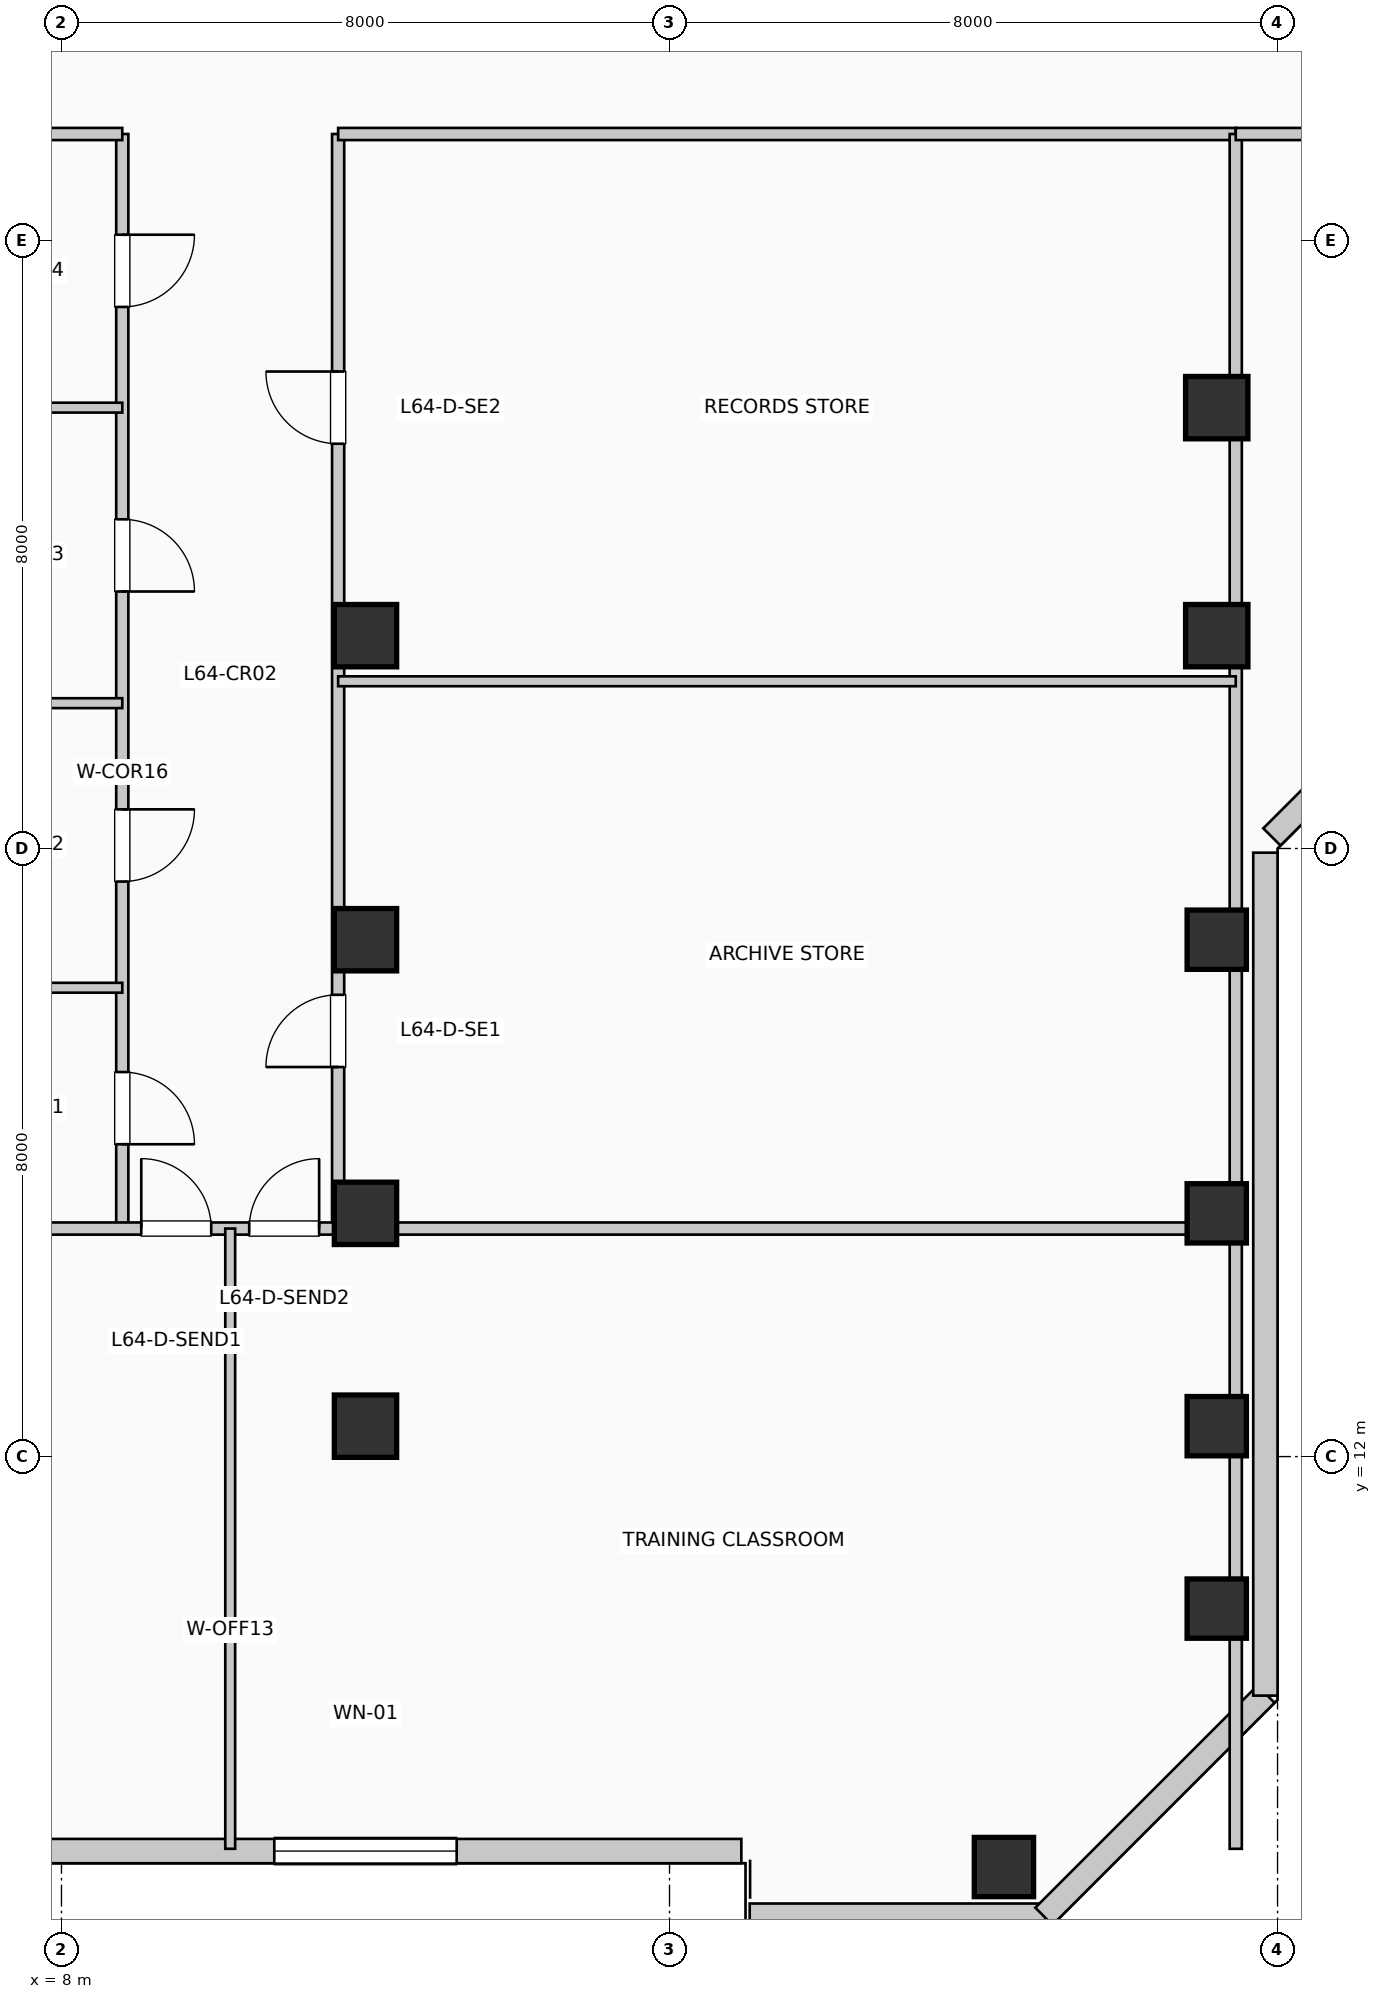
"""IFC4 building model, lengths in metres.
Left out: names, types, materials, properties, quantities, classifications, styles, units other than length and angle.
Written with IfcOpenShell. Run it as: python <this file> out.ifc"""

import sys

from ifc_helpers import new_model, si_unit, direction, frame, frame_2d, origin, origin_2d, place, context, subcontext, project, spatial, rectangle, extrude, element, fill, save


model = new_model("IFC4")
c1 = context("Model", 3, precision=1e-05, world=origin(), true_north=direction((0.0, 1.0)))
c2 = subcontext(c1, "Body", "Model", "MODEL_VIEW")
j1 = project(units=[si_unit("LENGTHUNIT", "METRE"), si_unit("PLANEANGLEUNIT", "RADIAN")], contexts=[c1])
p1 = place(None, origin())
s1 = spatial("IfcSite", under=j1, at=p1, CompositionType="ELEMENT")
p2 = place(p1, origin())
s2 = spatial("IfcBuilding", under=s1, at=p2, CompositionType="ELEMENT")
p3 = place(p2, frame((0.0, 0.0, 264.33)))
s3 = spatial("IfcBuildingStorey", under=s2, at=p3, CompositionType="ELEMENT", Elevation=264.33)
for number, where, z_axis, x_axis in (
    (1, (12.0, 12.4, 0.0), (0.0, 0.0, 1.0), (1.0, 0.0, 0.0)),
    (2, (12.0, 15.2, 0.0), (0.0, 0.0, 1.0), (1.0, 0.0, 0.0)),
    (3, (12.0, 18.8, 0.0), (0.0, 0.0, 1.0), (1.0, 0.0, 0.0)),
    (4, (12.0, 22.8, 0.0), (0.0, 0.0, 1.0), (1.0, 0.0, 0.0)),
):
    element("IfcColumn", number, at=place(p3, frame(where, z_axis=z_axis, x_axis=x_axis)), inside=s3, PredefinedType="COLUMN", context=c2, shape_type="SweptSolid", body=[
        extrude(rectangle(XDim=0.82, YDim=0.82, at=origin_2d()), origin(), (0.0, 0.0, 1.0), 3.96),
    ])
for number, where, z_axis, x_axis in (
    (5, (20.4, 6.6, 0.0), (0.0, 0.0, 1.0), (1.0, 0.0, 0.0)),
    (6, (23.2, 10.0, 0.0), (0.0, 0.0, 1.0), (1.0, 0.0, 0.0)),
    (7, (23.2, 12.4, 0.0), (0.0, 0.0, 1.0), (1.0, 0.0, 0.0)),
    (8, (23.2, 15.2, 0.0), (0.0, 0.0, 1.0), (1.0, 0.0, 0.0)),
    (9, (23.2, 18.8, 0.0), (0.0, 0.0, 1.0), (1.0, 0.0, 0.0)),
):
    element("IfcColumn", number, at=place(p3, frame(where, z_axis=z_axis, x_axis=x_axis)), inside=s3, PredefinedType="COLUMN", context=c2, shape_type="SweptSolid", body=[
        extrude(rectangle(XDim=0.78, YDim=0.78, at=origin_2d()), origin(), (0.0, 0.0, 1.0), 3.96),
    ])
for number, where, z_axis, x_axis in (
    (10, (23.2, 22.8, 0.0), (0.0, 0.0, 1.0), (1.0, 0.0, 0.0)),
    (11, (23.2, 25.8, 0.0), (0.0, 0.0, 1.0), (1.0, 0.0, 0.0)),
):
    element("IfcColumn", number, at=place(p3, frame(where, z_axis=z_axis, x_axis=x_axis)), inside=s3, PredefinedType="COLUMN", context=c2, shape_type="SweptSolid", body=[
        extrude(rectangle(XDim=0.82, YDim=0.82, at=origin_2d()), origin(), (0.0, 0.0, 1.0), 3.96),
    ])
p4 = place(p3, frame((7.055, 6.81, 0.0), z_axis=(0.0, 0.0, 1.0), x_axis=(1.0, 0.0, 0.0)))
e12 = element("IfcWall", 12, at=p4, inside=s3, PredefinedType="SOLIDWALL", context=c2, shape_type="SweptSolid", body=[
    extrude(rectangle(XDim=9.89, YDim=0.32, at=frame_2d((4.945, 0.0))), origin(), (0.0, 0.0, 1.0), 3.71),
])
p5 = place(p4, frame((3.745, 0.0, 0.85)))
e13 = element("IfcOpeningElement", 13, at=p5, cuts=e12, PredefinedType="OPENING", context=c2, shape_type="SweptSolid", body=[
    extrude(rectangle(XDim=2.4, YDim=2.05, at=frame_2d((1.2, 1.025))), frame((0.0, 0.17, 0.0), z_axis=(0.0, -1.0, 0.0), x_axis=(1.0, 0.0, 0.0)), (0.0, 0.0, 1.0), 0.34),
])
p6 = place(p3, frame((17.055, 5.96, 0.0), z_axis=(0.0, 0.0, 1.0), x_axis=(1.0, 0.0, 0.0)))
e14 = element("IfcWall", 14, at=p6, inside=s3, PredefinedType="SOLIDWALL", context=c2, shape_type="SweptSolid", body=[
    extrude(rectangle(XDim=3.89, YDim=0.32, at=frame_2d((1.945, 0.0))), origin(), (0.0, 0.0, 1.0), 3.71),
])
p7 = place(p3, frame((20.926, 5.952, 0.0), z_axis=(0.0, 0.0, 1.0), x_axis=(0.707077242712, 0.707136318428, 0.0)))
e15 = element("IfcWall", 15, at=p7, inside=s3, PredefinedType="SOLIDWALL", context=c2, shape_type="SweptSolid", body=[
    extrude(rectangle(XDim=4.133, YDim=0.32, at=frame_2d((2.066, 0.0))), origin(), (0.0, 0.0, 1.0), 3.71),
])
p8 = place(p3, frame((23.84, 8.855, 0.0), z_axis=(0.0, 0.0, 1.0), x_axis=(0.0, 1.0, 0.0)))
e16 = element("IfcWall", 16, at=p8, inside=s3, PredefinedType="SOLIDWALL", context=c2, shape_type="SweptSolid", body=[
    extrude(rectangle(XDim=11.09, YDim=0.32, at=frame_2d((5.545, 0.0))), origin(), (0.0, 0.0, 1.0), 3.71),
])
p9 = place(p3, frame((23.926, 20.152, 0.0), z_axis=(0.0, 0.0, 1.0), x_axis=(0.707106781187, 0.707106781187, 0.0)))
e17 = element("IfcWall", 17, at=p9, inside=s3, PredefinedType="SOLIDWALL", context=c2, shape_type="SweptSolid", body=[
    extrude(rectangle(XDim=2.718, YDim=0.32, at=frame_2d((1.359, 0.0))), origin(), (0.0, 0.0, 1.0), 3.71),
])
p10 = place(p3, frame((8.8, 15.0, 0.0), z_axis=(0.0, 0.0, 1.0), x_axis=(0.0, 1.0, 0.0)))
e18 = element("IfcWall", 18, at=p10, inside=s3, PredefinedType="PARTITIONING", context=c2, shape_type="SweptSolid", body=[
    extrude(rectangle(XDim=14.4, YDim=0.16, at=frame_2d((7.2, 0.0))), origin(), (0.0, 0.0, 1.0), 3.71),
])
p11 = place(p10, frame((2.059, 0.0, 0.0), z_axis=(0.0, 0.0, 1.0), x_axis=(-1.0, 0.0, 0.0)))
e19 = element("IfcOpeningElement", 19, at=p11, cuts=e18, PredefinedType="OPENING", context=c2, shape_type="SweptSolid", body=[
    extrude(rectangle(XDim=0.95, YDim=2.15, at=frame_2d((0.475, 1.075))), frame((0.0, 0.09, 0.0), z_axis=(0.0, -1.0, 0.0), x_axis=(1.0, 0.0, 0.0)), (0.0, 0.0, 1.0), 0.18),
])
p12 = place(p10, frame((5.515, 0.0, 0.0), z_axis=(0.0, 0.0, 1.0), x_axis=(-1.0, 0.0, 0.0)))
e20 = element("IfcOpeningElement", 20, at=p12, cuts=e18, PredefinedType="OPENING", context=c2, shape_type="SweptSolid", body=[
    extrude(rectangle(XDim=0.95, YDim=2.15, at=frame_2d((0.475, 1.075))), frame((0.0, 0.09, 0.0), z_axis=(0.0, -1.0, 0.0), x_axis=(1.0, 0.0, 0.0)), (0.0, 0.0, 1.0), 0.18),
])
p13 = place(p10, frame((9.331, 0.0, 0.0), z_axis=(0.0, 0.0, 1.0), x_axis=(-1.0, 0.0, 0.0)))
e21 = element("IfcOpeningElement", 21, at=p13, cuts=e18, PredefinedType="OPENING", context=c2, shape_type="SweptSolid", body=[
    extrude(rectangle(XDim=0.95, YDim=2.15, at=frame_2d((0.475, 1.075))), frame((0.0, 0.09, 0.0), z_axis=(0.0, -1.0, 0.0), x_axis=(1.0, 0.0, 0.0)), (0.0, 0.0, 1.0), 0.18),
])
p14 = place(p10, frame((13.075, 0.0, 0.0), z_axis=(0.0, 0.0, 1.0), x_axis=(-1.0, 0.0, 0.0)))
e22 = element("IfcOpeningElement", 22, at=p14, cuts=e18, PredefinedType="OPENING", context=c2, shape_type="SweptSolid", body=[
    extrude(rectangle(XDim=0.95, YDim=2.15, at=frame_2d((0.475, 1.075))), frame((0.0, 0.09, 0.0), z_axis=(0.0, -1.0, 0.0), x_axis=(1.0, 0.0, 0.0)), (0.0, 0.0, 1.0), 0.18),
])
p15 = place(p3, frame((11.64, 15.0, 0.0), z_axis=(0.0, 0.0, 1.0), x_axis=(0.0, 1.0, 0.0)))
e23 = element("IfcWall", 23, at=p15, inside=s3, PredefinedType="PARTITIONING", context=c2, shape_type="SweptSolid", body=[
    extrude(rectangle(XDim=14.4, YDim=0.16, at=frame_2d((7.2, 0.0))), origin(), (0.0, 0.0, 1.0), 3.095),
])
p16 = place(p15, frame((2.125, 0.0, 0.0)))
e24 = element("IfcOpeningElement", 24, at=p16, cuts=e23, PredefinedType="OPENING", context=c2, shape_type="SweptSolid", body=[
    extrude(rectangle(XDim=0.95, YDim=2.15, at=frame_2d((0.475, 1.075))), frame((0.0, 0.09, 0.0), z_axis=(0.0, -1.0, 0.0), x_axis=(1.0, 0.0, 0.0)), (0.0, 0.0, 1.0), 0.18),
])
p17 = place(p15, frame((10.325, 0.0, 0.0)))
e25 = element("IfcOpeningElement", 25, at=p17, cuts=e23, PredefinedType="OPENING", context=c2, shape_type="SweptSolid", body=[
    extrude(rectangle(XDim=0.95, YDim=2.15, at=frame_2d((0.475, 1.075))), frame((0.0, 0.09, 0.0), z_axis=(0.0, -1.0, 0.0), x_axis=(1.0, 0.0, 0.0)), (0.0, 0.0, 1.0), 0.18),
])
p18 = place(p3, frame((0.19, 15.0, 0.0), z_axis=(0.0, 0.0, 1.0), x_axis=(1.0, 0.0, 0.0)))
e26 = element("IfcWall", 26, at=p18, inside=s3, PredefinedType="PARTITIONING", context=c2, shape_type="SweptSolid", body=[
    extrude(rectangle(XDim=23.26, YDim=0.16, at=frame_2d((11.63, 0.0))), origin(), (0.0, 0.0, 1.0), 3.095),
])
p19 = place(p18, frame((8.86, 0.0, 0.0)))
e27 = element("IfcOpeningElement", 27, at=p19, cuts=e26, PredefinedType="OPENING", context=c2, shape_type="SweptSolid", body=[
    extrude(rectangle(XDim=0.92, YDim=2.1, at=frame_2d((0.46, 1.05))), frame((0.0, 0.09, 0.0), z_axis=(0.0, -1.0, 0.0), x_axis=(1.0, 0.0, 0.0)), (0.0, 0.0, 1.0), 0.18),
])
p20 = place(p18, frame((10.28, 0.0, 0.0)))
e28 = element("IfcOpeningElement", 28, at=p20, cuts=e26, PredefinedType="OPENING", context=c2, shape_type="SweptSolid", body=[
    extrude(rectangle(XDim=0.92, YDim=2.1, at=frame_2d((0.46, 1.05))), frame((0.0, 0.09, 0.0), z_axis=(0.0, -1.0, 0.0), x_axis=(1.0, 0.0, 0.0)), (0.0, 0.0, 1.0), 0.18),
])
p21 = place(p3, frame((0.19, 29.4, 0.0), z_axis=(0.0, 0.0, 1.0), x_axis=(1.0, 0.0, 0.0)))
e29 = element("IfcWall", 29, at=p21, inside=s3, PredefinedType="PARTITIONING", context=c2, shape_type="SweptSolid", body=[
    extrude(rectangle(XDim=8.61, YDim=0.16, at=frame_2d((4.305, 0.0))), origin(), (0.0, 0.0, 1.0), 3.365),
])
p22 = place(p3, frame((11.64, 29.4, 0.0), z_axis=(0.0, 0.0, 1.0), x_axis=(1.0, 0.0, 0.0)))
e30 = element("IfcWall", 30, at=p22, inside=s3, PredefinedType="PARTITIONING", context=c2, shape_type="SweptSolid", body=[
    extrude(rectangle(XDim=11.81, YDim=0.16, at=frame_2d((5.905, 0.0))), origin(), (0.0, 0.0, 1.0), 3.365),
])
p23 = place(p3, frame((23.45, 6.84, 0.0), z_axis=(0.0, 0.0, 1.0), x_axis=(0.0, 1.0, 0.0)))
e31 = element("IfcWall", 31, at=p23, inside=s3, PredefinedType="PARTITIONING", context=c2, shape_type="SweptSolid", body=[
    extrude(rectangle(XDim=22.56, YDim=0.16, at=frame_2d((11.28, 0.0))), origin(), (0.0, 0.0, 1.0), 3.095),
])
p24 = place(p3, frame((10.22, 6.84, 0.0), z_axis=(0.0, 0.0, 1.0), x_axis=(0.0, 1.0, 0.0)))
e32 = element("IfcWall", 32, at=p24, inside=s3, PredefinedType="PARTITIONING", context=c2, shape_type="SweptSolid", body=[
    extrude(rectangle(XDim=8.16, YDim=0.13, at=frame_2d((4.08, 0.0))), origin(), (0.0, 0.0, 1.0), 3.71),
])
for number, where, z_axis, x_axis in (
    (33, (0.19, 18.168, 0.0), (0.0, 0.0, 1.0), (1.0, 0.0, 0.0)),
    (34, (0.19, 21.912, 0.0), (0.0, 0.0, 1.0), (1.0, 0.0, 0.0)),
):
    element("IfcWall", number, at=place(p3, frame(where, z_axis=z_axis, x_axis=x_axis)), inside=s3, PredefinedType="PARTITIONING", context=c2, shape_type="SweptSolid", body=[
        extrude(rectangle(XDim=8.61, YDim=0.13, at=frame_2d((4.305, 0.0))), origin(), (0.0, 0.0, 1.0), 3.71),
    ])
p25 = place(p3, frame((0.19, 25.8, 0.0), z_axis=(0.0, 0.0, 1.0), x_axis=(1.0, 0.0, 0.0)))
e35 = element("IfcWall", 35, at=p25, inside=s3, PredefinedType="PARTITIONING", context=c2, shape_type="SweptSolid", body=[
    extrude(rectangle(XDim=8.61, YDim=0.13, at=frame_2d((4.305, 0.0))), origin(), (0.0, 0.0, 1.0), 3.095),
])
p26 = place(p3, frame((11.64, 22.2, 0.0), z_axis=(0.0, 0.0, 1.0), x_axis=(1.0, 0.0, 0.0)))
e36 = element("IfcWall", 36, at=p26, inside=s3, PredefinedType="PARTITIONING", context=c2, shape_type="SweptSolid", body=[
    extrude(rectangle(XDim=11.81, YDim=0.13, at=frame_2d((5.905, 0.0))), origin(), (0.0, 0.0, 1.0), 3.71),
])
p27 = place(p3, frame((23.45, 29.4, 0.0), z_axis=(0.0, 0.0, 1.0), x_axis=(1.0, 0.0, 0.0)))
e37 = element("IfcWall", 37, at=p27, inside=s3, PredefinedType="PARTITIONING", context=c2, shape_type="SweptSolid", body=[
    extrude(rectangle(XDim=26.56, YDim=0.16, at=frame_2d((13.28, 0.0))), origin(), (0.0, 0.0, 1.0), 3.365),
])
p28 = place(p27, frame((7.115, 0.0, 0.0), z_axis=(0.0, 0.0, 1.0), x_axis=(-1.0, 0.0, 0.0)))
e38 = element("IfcOpeningElement", 38, at=p28, cuts=e37, PredefinedType="OPENING", context=c2, shape_type="SweptSolid", body=[
    extrude(rectangle(XDim=0.95, YDim=2.15, at=frame_2d((0.475, 1.075))), frame((0.0, 0.09, 0.0), z_axis=(0.0, -1.0, 0.0), x_axis=(1.0, 0.0, 0.0)), (0.0, 0.0, 1.0), 0.18),
])
p29 = place(p27, frame((20.395, 0.0, 0.0), z_axis=(0.0, 0.0, 1.0), x_axis=(-1.0, 0.0, 0.0)))
e39 = element("IfcOpeningElement", 39, at=p29, cuts=e37, PredefinedType="OPENING", context=c2, shape_type="SweptSolid", body=[
    extrude(rectangle(XDim=0.95, YDim=2.15, at=frame_2d((0.475, 1.075))), frame((0.0, 0.09, 0.0), z_axis=(0.0, -1.0, 0.0), x_axis=(1.0, 0.0, 0.0)), (0.0, 0.0, 1.0), 0.18),
])
p30 = place(p5, origin())
e40 = element("IfcWindow", 40, at=p30, inside=s3, PartitioningType="SINGLE_PANEL", PredefinedType="WINDOW", context=c2, shape_type="SweptSolid", body=[
    extrude(rectangle(XDim=2.4, YDim=2.05, at=frame_2d((1.2, 1.025))), frame((0.0, 0.03, 0.0), z_axis=(0.0, -1.0, 0.0), x_axis=(1.0, 0.0, 0.0)), (0.0, 0.0, 1.0), 0.06),
])
fill(e13, e40)
p31 = place(p19, origin())
e41 = element("IfcDoor", 41, at=p31, inside=s3, OperationType="SINGLE_SWING_LEFT", PredefinedType="DOOR", context=c2, shape_type="SweptSolid", body=[
    extrude(rectangle(XDim=0.92, YDim=2.1, at=frame_2d((0.46, 1.05))), frame((0.0, 0.025, 0.0), z_axis=(0.0, -1.0, 0.0), x_axis=(1.0, 0.0, 0.0)), (0.0, 0.0, 1.0), 0.05),
])
fill(e27, e41)
p32 = place(p20, origin())
e42 = element("IfcDoor", 42, at=p32, inside=s3, OperationType="SINGLE_SWING_RIGHT", PredefinedType="DOOR", context=c2, shape_type="SweptSolid", body=[
    extrude(rectangle(XDim=0.92, YDim=2.1, at=frame_2d((0.46, 1.05))), frame((0.0, 0.025, 0.0), z_axis=(0.0, -1.0, 0.0), x_axis=(1.0, 0.0, 0.0)), (0.0, 0.0, 1.0), 0.05),
])
fill(e28, e42)
p33 = place(p11, origin())
e43 = element("IfcDoor", 43, at=p33, inside=s3, OperationType="SINGLE_SWING_LEFT", PredefinedType="DOOR", context=c2, shape_type="SweptSolid", body=[
    extrude(rectangle(XDim=0.95, YDim=2.15, at=frame_2d((0.475, 1.075))), frame((0.0, 0.025, 0.0), z_axis=(0.0, -1.0, 0.0), x_axis=(1.0, 0.0, 0.0)), (0.0, 0.0, 1.0), 0.05),
])
fill(e19, e43)
p34 = place(p12, origin())
e44 = element("IfcDoor", 44, at=p34, inside=s3, OperationType="SINGLE_SWING_RIGHT", PredefinedType="DOOR", context=c2, shape_type="SweptSolid", body=[
    extrude(rectangle(XDim=0.95, YDim=2.15, at=frame_2d((0.475, 1.075))), frame((0.0, 0.025, 0.0), z_axis=(0.0, -1.0, 0.0), x_axis=(1.0, 0.0, 0.0)), (0.0, 0.0, 1.0), 0.05),
])
fill(e20, e44)
p35 = place(p13, origin())
e45 = element("IfcDoor", 45, at=p35, inside=s3, OperationType="SINGLE_SWING_LEFT", PredefinedType="DOOR", context=c2, shape_type="SweptSolid", body=[
    extrude(rectangle(XDim=0.95, YDim=2.15, at=frame_2d((0.475, 1.075))), frame((0.0, 0.025, 0.0), z_axis=(0.0, -1.0, 0.0), x_axis=(1.0, 0.0, 0.0)), (0.0, 0.0, 1.0), 0.05),
])
fill(e21, e45)
p36 = place(p14, origin())
e46 = element("IfcDoor", 46, at=p36, inside=s3, OperationType="SINGLE_SWING_RIGHT", PredefinedType="DOOR", context=c2, shape_type="SweptSolid", body=[
    extrude(rectangle(XDim=0.95, YDim=2.15, at=frame_2d((0.475, 1.075))), frame((0.0, 0.025, 0.0), z_axis=(0.0, -1.0, 0.0), x_axis=(1.0, 0.0, 0.0)), (0.0, 0.0, 1.0), 0.05),
])
fill(e22, e46)
p37 = place(p16, origin())
e47 = element("IfcDoor", 47, at=p37, inside=s3, OperationType="SINGLE_SWING_LEFT", PredefinedType="DOOR", context=c2, shape_type="SweptSolid", body=[
    extrude(rectangle(XDim=0.95, YDim=2.15, at=frame_2d((0.475, 1.075))), frame((0.0, 0.025, 0.0), z_axis=(0.0, -1.0, 0.0), x_axis=(1.0, 0.0, 0.0)), (0.0, 0.0, 1.0), 0.05),
])
fill(e24, e47)
p38 = place(p17, origin())
e48 = element("IfcDoor", 48, at=p38, inside=s3, OperationType="SINGLE_SWING_RIGHT", PredefinedType="DOOR", context=c2, shape_type="SweptSolid", body=[
    extrude(rectangle(XDim=0.95, YDim=2.15, at=frame_2d((0.475, 1.075))), frame((0.0, 0.025, 0.0), z_axis=(0.0, -1.0, 0.0), x_axis=(1.0, 0.0, 0.0)), (0.0, 0.0, 1.0), 0.05),
])
fill(e25, e48)
save(model, sys.argv[1])
